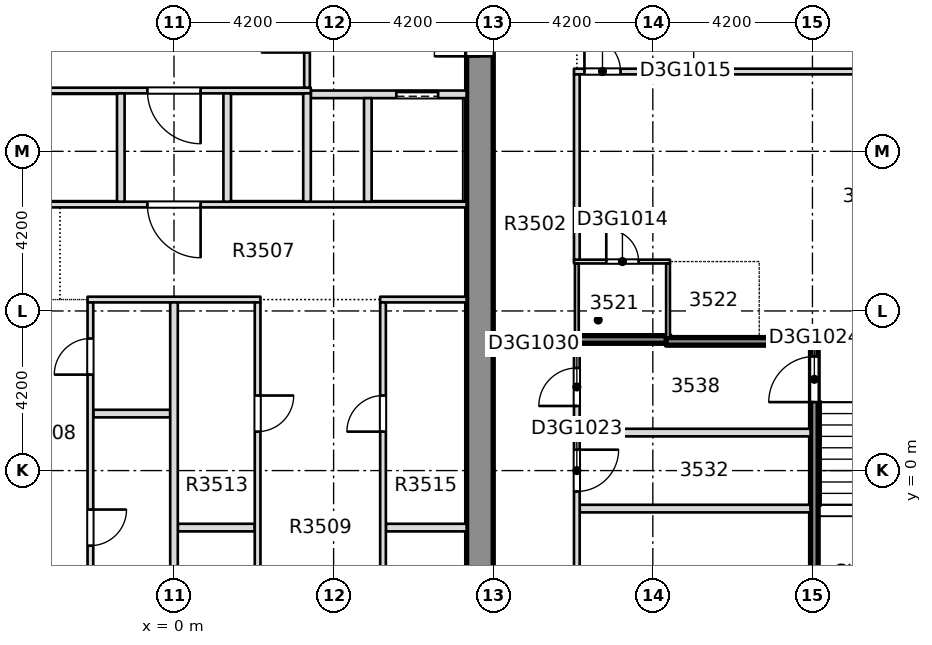
"""IFC4 building model, lengths in metres.
Left out: names, types, materials, properties, quantities, classifications, styles, units other than length and angle.
Written with IfcOpenShell. Run it as: python <this file> out.ifc"""

import sys

from ifc_helpers import new_model, si_unit, direction, frame, frame_2d, origin, place, context, subcontext, project, spatial, rectangle, extrude, element, fill, save


model = new_model("IFC4")
c1 = context("Model", 3, precision=1e-05, world=origin(), true_north=direction((0.0, 1.0)))
c2 = subcontext(c1, "Body", "Model", "MODEL_VIEW")
j1 = project(units=[si_unit("LENGTHUNIT", "METRE"), si_unit("PLANEANGLEUNIT", "RADIAN")], contexts=[c1])
p1 = place(None, origin())
s1 = spatial("IfcSite", under=j1, at=p1, CompositionType="ELEMENT")
p2 = place(p1, origin())
s2 = spatial("IfcBuilding", under=s1, at=p2, CompositionType="ELEMENT")
p3 = place(p2, frame((0.0, 0.0, 140.0)))
s3 = spatial("IfcBuildingStorey", under=s2, at=p3, CompositionType="ELEMENT", Elevation=140.0)
p4 = place(p3, frame((8.05, -8.4, -0.4), z_axis=(0.0, 0.0, 1.0), x_axis=(0.0, 1.0, 0.0)))
e1 = element("IfcWall", 1, at=p4, inside=s3, PredefinedType="SOLIDWALL", context=c2, shape_type="SweptSolid", body=[
    extrude(rectangle(XDim=30.15, YDim=0.7, at=frame_2d((15.075, 0.0))), origin(), (0.0, 0.0, 1.0), 3.45),
])
p5 = place(p4, frame((19.3, 0.0, 0.4)))
e2 = element("IfcOpeningElement", 2, at=p5, cuts=e1, PredefinedType="OPENING", context=c2, shape_type="SweptSolid", body=[
    extrude(rectangle(XDim=1.2, YDim=2.1, at=frame_2d((0.6, 1.05))), frame((0.0, 0.36, 0.0), z_axis=(0.0, -1.0, 0.0), x_axis=(1.0, 0.0, 0.0)), (0.0, 0.0, 1.0), 0.72),
])
p6 = place(p3, frame((10.677, -1.0, 0.0), z_axis=(0.0, 0.0, 1.0), x_axis=(1.0, 0.0, 0.0)))
e3 = element("IfcWall", 3, at=p6, inside=s3, PredefinedType="PARTITIONING", context=c2, shape_type="SweptSolid", body=[
    extrude(rectangle(XDim=6.071, YDim=0.2, at=frame_2d((3.036, 0.0))), origin(), (0.0, 0.0, 1.0), 3.05),
])
p7 = place(p3, frame((10.675, 1.0, 0.0), z_axis=(0.0, 0.0, 1.0), x_axis=(1.0, 0.0, 0.0)))
e4 = element("IfcWall", 4, at=p7, inside=s3, PredefinedType="PARTITIONING", context=c2, shape_type="SweptSolid", body=[
    extrude(rectangle(XDim=6.075, YDim=0.2, at=frame_2d((3.038, 0.0))), origin(), (0.0, 0.0, 1.0), 3.05),
])
p8 = place(p3, frame((10.525, 3.45, 0.0), z_axis=(0.0, 0.0, 1.0), x_axis=(1.0, 0.0, 0.0)))
e5 = element("IfcWall", 5, at=p8, inside=s3, PredefinedType="SOLIDWALL", context=c2, shape_type="SweptSolid", body=[
    extrude(rectangle(XDim=2.525, YDim=0.2, at=frame_2d((1.263, 0.0))), origin(), (0.0, 0.0, 1.0), 3.05),
])
p9 = place(p3, frame((12.95, 3.4, 0.0), z_axis=(0.0, 0.0, 1.0), x_axis=(1.0, 0.0, 0.0)))
e6 = element("IfcWall", 6, at=p9, inside=s3, PredefinedType="SOLIDWALL", context=c2, shape_type="SweptSolid", body=[
    extrude(rectangle(XDim=8.6, YDim=0.2, at=frame_2d((4.3, 0.0))), origin(), (0.0, 0.0, 1.0), 3.05),
])
p10 = place(p3, frame((10.525, 5.5, 0.0), z_axis=(0.0, 0.0, 1.0), x_axis=(1.0, 0.0, 0.0)))
e7 = element("IfcWall", 7, at=p10, inside=s3, PredefinedType="PARTITIONING", context=c2, shape_type="SweptSolid", body=[
    extrude(rectangle(XDim=2.525, YDim=0.1, at=frame_2d((1.263, 0.0))), origin(), (0.0, 0.0, 1.0), 3.05),
])
p11 = place(p10, frame((0.85, 0.0, 0.0)))
e8 = element("IfcOpeningElement", 8, at=p11, cuts=e7, PredefinedType="OPENING", context=c2, shape_type="SweptSolid", body=[
    extrude(rectangle(XDim=0.85, YDim=2.1, at=frame_2d((0.425, 1.05))), frame((0.0, 0.06, 0.0), z_axis=(0.0, -1.0, 0.0), x_axis=(1.0, 0.0, 0.0)), (0.0, 0.0, 1.0), 0.12),
])
p12 = place(p3, frame((10.525, 10.5, 0.0), z_axis=(0.0, 0.0, 1.0), x_axis=(1.0, 0.0, 0.0)))
e9 = element("IfcWall", 9, at=p12, inside=s3, PredefinedType="PARTITIONING", context=c2, shape_type="SweptSolid", body=[
    extrude(rectangle(XDim=11.025, YDim=0.15, at=frame_2d((5.513, 0.0))), origin(), (0.0, 0.0, 1.0), 3.05),
])
p13 = place(p12, frame((0.275, 0.0, 0.0)))
e10 = element("IfcOpeningElement", 10, at=p13, cuts=e9, PredefinedType="OPENING", context=c2, shape_type="SweptSolid", body=[
    extrude(rectangle(XDim=0.95, YDim=2.1, at=frame_2d((0.475, 1.05))), frame((0.0, 0.085, 0.0), z_axis=(0.0, -1.0, 0.0), x_axis=(1.0, 0.0, 0.0)), (0.0, 0.0, 1.0), 0.17),
])
p14 = place(p3, frame((10.6, -10.29, 0.0), z_axis=(0.0, 0.0, 1.0), x_axis=(0.0, 1.0, 0.0)))
e11 = element("IfcWall", 11, at=p14, inside=s3, PredefinedType="PARTITIONING", context=c2, shape_type="SweptSolid", body=[
    extrude(rectangle(XDim=13.64, YDim=0.15, at=frame_2d((6.82, 0.0))), origin(), (0.0, 0.0, 1.0), 3.05),
])
p15 = place(p14, frame((2.09, 0.0, 0.0)))
e12 = element("IfcOpeningElement", 12, at=p15, cuts=e11, PredefinedType="OPENING", context=c2, shape_type="SweptSolid", body=[
    extrude(rectangle(XDim=0.95, YDim=2.1, at=frame_2d((0.475, 1.05))), frame((0.0, 0.085, 0.0), z_axis=(0.0, -1.0, 0.0), x_axis=(1.0, 0.0, 0.0)), (0.0, 0.0, 1.0), 0.17),
])
p16 = place(p14, frame((9.74, 0.0, 0.0)))
e13 = element("IfcOpeningElement", 13, at=p16, cuts=e11, PredefinedType="OPENING", context=c2, shape_type="SweptSolid", body=[
    extrude(rectangle(XDim=1.1, YDim=2.1, at=frame_2d((0.55, 1.05))), frame((0.0, 0.085, 0.0), z_axis=(0.0, -1.0, 0.0), x_axis=(1.0, 0.0, 0.0)), (0.0, 0.0, 1.0), 0.17),
])
p17 = place(p14, frame((4.59, 0.0, 0.0)))
e14 = element("IfcOpeningElement", 14, at=p17, cuts=e11, PredefinedType="OPENING", context=c2, shape_type="SweptSolid", body=[
    extrude(rectangle(XDim=1.0, YDim=2.1, at=frame_2d((0.5, 1.05))), frame((0.0, 0.085, 0.0), z_axis=(0.0, -1.0, 0.0), x_axis=(1.0, 0.0, 0.0)), (0.0, 0.0, 1.0), 0.17),
])
p18 = place(p14, frame((11.99, 0.0, 0.0)))
e15 = element("IfcOpeningElement", 15, at=p18, cuts=e11, PredefinedType="OPENING", context=c2, shape_type="SweptSolid", body=[
    extrude(rectangle(XDim=1.0, YDim=2.1, at=frame_2d((0.5, 1.05))), frame((0.0, 0.085, 0.0), z_axis=(0.0, -1.0, 0.0), x_axis=(1.0, 0.0, 0.0)), (0.0, 0.0, 1.0), 0.17),
])
p19 = place(p3, frame((10.6, 3.45, 0.0), z_axis=(0.0, 0.0, 1.0), x_axis=(0.0, 1.0, 0.0)))
e16 = element("IfcWall", 16, at=p19, inside=s3, PredefinedType="PARTITIONING", context=c2, shape_type="SweptSolid", body=[
    extrude(rectangle(XDim=2.0, YDim=0.1, at=frame_2d((1.0, 0.0))), origin(), (0.0, 0.0, 1.0), 3.05),
])
p20 = place(p3, frame((10.6, 5.55, 0.0), z_axis=(0.0, 0.0, 1.0), x_axis=(0.0, 1.0, 0.0)))
e17 = element("IfcWall", 17, at=p20, inside=s3, PredefinedType="PARTITIONING", context=c2, shape_type="SweptSolid", body=[
    extrude(rectangle(XDim=4.875, YDim=0.15, at=frame_2d((2.438, 0.0))), origin(), (0.0, 0.0, 1.0), 3.05),
])
p21 = place(p3, frame((13.0, 3.5, 0.0), z_axis=(0.0, 0.0, 1.0), x_axis=(0.0, 1.0, 0.0)))
e18 = element("IfcWall", 18, at=p21, inside=s3, PredefinedType="PARTITIONING", context=c2, shape_type="SweptSolid", body=[
    extrude(rectangle(XDim=1.95, YDim=0.1, at=frame_2d((0.975, 0.0))), origin(), (0.0, 0.0, 1.0), 3.05),
])
p22 = place(p3, frame((16.85, -3.298, 0.0), z_axis=(0.0, 0.0, 1.0), x_axis=(0.0, 1.0, 0.0)))
e19 = element("IfcWall", 19, at=p22, inside=s3, PredefinedType="SOLIDWALL", context=c2, shape_type="SweptSolid", body=[
    extrude(rectangle(XDim=6.598, YDim=0.2, at=frame_2d((3.299, 0.0))), origin(), (0.0, 0.0, 1.0), 3.05),
])
p23 = place(p22, frame((5.1, 0.0, 0.0)))
e20 = element("IfcOpeningElement", 20, at=p23, cuts=e19, PredefinedType="OPENING", context=c2, shape_type="SweptSolid", body=[
    extrude(rectangle(XDim=1.2, YDim=2.1, at=frame_2d((0.6, 1.05))), frame((0.0, 0.11, 0.0), z_axis=(0.0, -1.0, 0.0), x_axis=(1.0, 0.0, 0.0)), (0.0, 0.0, 1.0), 0.22),
])
p24 = place(p3, frame((0.1, -1.5, 0.0), z_axis=(0.0, 0.0, 1.0), x_axis=(1.0, 0.0, 0.0)))
e21 = element("IfcWall", 21, at=p24, inside=s3, PredefinedType="PARTITIONING", context=c2, shape_type="SweptSolid", body=[
    extrude(rectangle(XDim=2.025, YDim=0.2, at=frame_2d((1.012, 0.0))), origin(), (0.0, 0.0, 1.0), 3.05),
])
p25 = place(p3, frame((5.575, -1.5, 0.0), z_axis=(0.0, 0.0, 1.0), x_axis=(1.0, 0.0, 0.0)))
e22 = element("IfcWall", 22, at=p25, inside=s3, PredefinedType="PARTITIONING", context=c2, shape_type="SweptSolid", body=[
    extrude(rectangle(XDim=2.124, YDim=0.2, at=frame_2d((1.062, 0.0))), origin(), (0.0, 0.0, 1.0), 3.05),
])
p26 = place(p3, frame((-2.125, 1.5, 0.0), z_axis=(0.0, 0.0, 1.0), x_axis=(1.0, 0.0, 0.0)))
e23 = element("IfcWall", 23, at=p26, inside=s3, PredefinedType="PARTITIONING", context=c2, shape_type="SweptSolid", body=[
    extrude(rectangle(XDim=2.025, YDim=0.2, at=frame_2d((1.012, 0.0))), origin(), (0.0, 0.0, 1.0), 3.05),
])
p27 = place(p3, frame((-2.275, 4.5, 0.0), z_axis=(0.0, 0.0, 1.0), x_axis=(1.0, 0.0, 0.0)))
e24 = element("IfcWall", 24, at=p27, inside=s3, PredefinedType="PARTITIONING", context=c2, shape_type="SweptSolid", body=[
    extrude(rectangle(XDim=4.55, YDim=0.15, at=frame_2d((2.275, 0.0))), origin(), (0.0, 0.0, 1.0), 3.05),
])
p28 = place(p3, frame((5.425, 4.5, 0.0), z_axis=(0.0, 0.0, 1.0), x_axis=(1.0, 0.0, 0.0)))
e25 = element("IfcWall", 25, at=p28, inside=s3, PredefinedType="PARTITIONING", context=c2, shape_type="SweptSolid", body=[
    extrude(rectangle(XDim=2.274, YDim=0.15, at=frame_2d((1.137, 0.0))), origin(), (0.0, 0.0, 1.0), 3.05),
])
p29 = place(p3, frame((-7.699, 7.0, 0.0), z_axis=(0.0, 0.0, 1.0), x_axis=(1.0, 0.0, 0.0)))
e26 = element("IfcWall", 26, at=p29, inside=s3, PredefinedType="PARTITIONING", context=c2, shape_type="SweptSolid", body=[
    extrude(rectangle(XDim=15.398, YDim=0.15, at=frame_2d((7.699, 0.0))), origin(), (0.0, 0.0, 1.0), 3.05),
])
p30 = place(p29, frame((6.999, 0.0, 0.0)))
e27 = element("IfcOpeningElement", 27, at=p30, cuts=e26, PredefinedType="OPENING", context=c2, shape_type="SweptSolid", body=[
    extrude(rectangle(XDim=1.4, YDim=2.1, at=frame_2d((0.7, 1.05))), frame((0.0, 0.085, 0.0), z_axis=(0.0, -1.0, 0.0), x_axis=(1.0, 0.0, 0.0)), (0.0, 0.0, 1.0), 0.17),
])
p31 = place(p3, frame((3.6, 9.9, 0.0), z_axis=(0.0, 0.0, 1.0), x_axis=(1.0, 0.0, 0.0)))
e28 = element("IfcWall", 28, at=p31, inside=s3, PredefinedType="PARTITIONING", context=c2, shape_type="SweptSolid", body=[
    extrude(rectangle(XDim=4.099, YDim=0.2, at=frame_2d((2.049, 0.0))), origin(), (0.0, 0.0, 1.0), 3.05),
])
p32 = place(p31, frame((2.25, 0.0, 0.0)))
e29 = element("IfcOpeningElement", 29, at=p32, cuts=e28, PredefinedType="OPENING", context=c2, shape_type="SweptSolid", body=[
    extrude(rectangle(XDim=1.1, YDim=2.1, at=frame_2d((0.55, 1.05))), frame((0.0, 0.11, 0.0), z_axis=(0.0, -1.0, 0.0), x_axis=(1.0, 0.0, 0.0)), (0.0, 0.0, 1.0), 0.22),
])
p33 = place(p3, frame((-3.6, 10.0, 0.0), z_axis=(0.0, 0.0, 1.0), x_axis=(1.0, 0.0, 0.0)))
e30 = element("IfcWall", 30, at=p33, inside=s3, PredefinedType="PARTITIONING", context=c2, shape_type="SweptSolid", body=[
    extrude(rectangle(XDim=7.2, YDim=0.15, at=frame_2d((3.6, 0.0))), origin(), (0.0, 0.0, 1.0), 3.05),
])
p34 = place(p33, frame((2.9, 0.0, 0.0)))
e31 = element("IfcOpeningElement", 31, at=p34, cuts=e30, PredefinedType="OPENING", context=c2, shape_type="SweptSolid", body=[
    extrude(rectangle(XDim=1.4, YDim=2.1, at=frame_2d((0.7, 1.05))), frame((0.0, 0.085, 0.0), z_axis=(0.0, -1.0, 0.0), x_axis=(1.0, 0.0, 0.0)), (0.0, 0.0, 1.0), 0.17),
])
p35 = place(p3, frame((-2.2, -7.699, 0.0), z_axis=(0.0, 0.0, 1.0), x_axis=(0.0, 1.0, 0.0)))
e32 = element("IfcWall", 32, at=p35, inside=s3, PredefinedType="PARTITIONING", context=c2, shape_type="SweptSolid", body=[
    extrude(rectangle(XDim=12.124, YDim=0.15, at=frame_2d((6.062, 0.0))), origin(), (0.0, 0.0, 1.0), 3.05),
])
p36 = place(p35, frame((1.149, 0.0, 0.0)))
e33 = element("IfcOpeningElement", 33, at=p36, cuts=e32, PredefinedType="OPENING", context=c2, shape_type="SweptSolid", body=[
    extrude(rectangle(XDim=1.1, YDim=2.1, at=frame_2d((0.55, 1.05))), frame((0.0, 0.085, 0.0), z_axis=(0.0, -1.0, 0.0), x_axis=(1.0, 0.0, 0.0)), (0.0, 0.0, 1.0), 0.17),
])
p37 = place(p35, frame((5.724, 0.0, 0.0)))
e34 = element("IfcOpeningElement", 34, at=p37, cuts=e32, PredefinedType="OPENING", context=c2, shape_type="SweptSolid", body=[
    extrude(rectangle(XDim=0.95, YDim=2.1, at=frame_2d((0.475, 1.05))), frame((0.0, 0.085, 0.0), z_axis=(0.0, -1.0, 0.0), x_axis=(1.0, 0.0, 0.0)), (0.0, 0.0, 1.0), 0.17),
])
p38 = place(p35, frame((10.224, 0.0, 0.0)))
e35 = element("IfcOpeningElement", 35, at=p38, cuts=e32, PredefinedType="OPENING", context=c2, shape_type="SweptSolid", body=[
    extrude(rectangle(XDim=0.95, YDim=2.1, at=frame_2d((0.475, 1.05))), frame((0.0, 0.085, 0.0), z_axis=(0.0, -1.0, 0.0), x_axis=(1.0, 0.0, 0.0)), (0.0, 0.0, 1.0), 0.17),
])
p39 = place(p3, frame((-1.4, 7.075, 0.0), z_axis=(0.0, 0.0, 1.0), x_axis=(0.0, 1.0, 0.0)))
e36 = element("IfcWall", 36, at=p39, inside=s3, PredefinedType="PARTITIONING", context=c2, shape_type="SweptSolid", body=[
    extrude(rectangle(XDim=2.85, YDim=0.2, at=frame_2d((1.425, 0.0))), origin(), (0.0, 0.0, 1.0), 3.05),
])
p40 = place(p3, frame((0.0, -7.699, 0.0), z_axis=(0.0, 0.0, 1.0), x_axis=(0.0, 1.0, 0.0)))
e37 = element("IfcWall", 37, at=p40, inside=s3, PredefinedType="PARTITIONING", context=c2, shape_type="SweptSolid", body=[
    extrude(rectangle(XDim=12.124, YDim=0.2, at=frame_2d((6.062, 0.0))), origin(), (0.0, 0.0, 1.0), 3.05),
])
p41 = place(p3, frame((1.4, 7.075, 0.0), z_axis=(0.0, 0.0, 1.0), x_axis=(0.0, 1.0, 0.0)))
e38 = element("IfcWall", 38, at=p41, inside=s3, PredefinedType="PARTITIONING", context=c2, shape_type="SweptSolid", body=[
    extrude(rectangle(XDim=2.85, YDim=0.2, at=frame_2d((1.425, 0.0))), origin(), (0.0, 0.0, 1.0), 3.05),
])
p42 = place(p3, frame((2.2, -7.699, 0.0), z_axis=(0.0, 0.0, 1.0), x_axis=(0.0, 1.0, 0.0)))
e39 = element("IfcWall", 39, at=p42, inside=s3, PredefinedType="PARTITIONING", context=c2, shape_type="SweptSolid", body=[
    extrude(rectangle(XDim=12.124, YDim=0.15, at=frame_2d((6.062, 0.0))), origin(), (0.0, 0.0, 1.0), 3.05),
])
p43 = place(p42, frame((2.724, 0.0, 0.0)))
e40 = element("IfcOpeningElement", 40, at=p43, cuts=e39, PredefinedType="OPENING", context=c2, shape_type="SweptSolid", body=[
    extrude(rectangle(XDim=0.95, YDim=2.1, at=frame_2d((0.475, 1.05))), frame((0.0, 0.085, 0.0), z_axis=(0.0, -1.0, 0.0), x_axis=(1.0, 0.0, 0.0)), (0.0, 0.0, 1.0), 0.17),
])
p44 = place(p42, frame((8.724, 0.0, 0.0)))
e41 = element("IfcOpeningElement", 41, at=p44, cuts=e39, PredefinedType="OPENING", context=c2, shape_type="SweptSolid", body=[
    extrude(rectangle(XDim=0.95, YDim=2.1, at=frame_2d((0.475, 1.05))), frame((0.0, 0.085, 0.0), z_axis=(0.0, -1.0, 0.0), x_axis=(1.0, 0.0, 0.0)), (0.0, 0.0, 1.0), 0.17),
])
p45 = place(p3, frame((3.5, 7.075, 0.0), z_axis=(0.0, 0.0, 1.0), x_axis=(0.0, 1.0, 0.0)))
e42 = element("IfcWall", 42, at=p45, inside=s3, PredefinedType="PARTITIONING", context=c2, shape_type="SweptSolid", body=[
    extrude(rectangle(XDim=2.85, YDim=0.2, at=frame_2d((1.425, 0.0))), origin(), (0.0, 0.0, 1.0), 3.05),
])
p46 = place(p3, frame((3.5, 10.075, 0.0), z_axis=(0.0, 0.0, 1.0), x_axis=(0.0, 1.0, 0.0)))
e43 = element("IfcWall", 43, at=p46, inside=s3, PredefinedType="PARTITIONING", context=c2, shape_type="SweptSolid", body=[
    extrude(rectangle(XDim=3.075, YDim=0.15, at=frame_2d((1.538, 0.0))), origin(), (0.0, 0.0, 1.0), 3.05),
])
p47 = place(p46, frame((0.925, 0.0, 0.0)))
e44 = element("IfcOpeningElement", 44, at=p47, cuts=e43, PredefinedType="OPENING", context=c2, shape_type="SweptSolid", body=[
    extrude(rectangle(XDim=1.2, YDim=2.1, at=frame_2d((0.6, 1.05))), frame((0.0, 0.085, 0.0), z_axis=(0.0, -1.0, 0.0), x_axis=(1.0, 0.0, 0.0)), (0.0, 0.0, 1.0), 0.17),
])
p48 = place(p3, frame((5.1, 7.075, 0.0), z_axis=(0.0, 0.0, 1.0), x_axis=(0.0, 1.0, 0.0)))
e45 = element("IfcWall", 45, at=p48, inside=s3, PredefinedType="PARTITIONING", context=c2, shape_type="SweptSolid", body=[
    extrude(rectangle(XDim=2.725, YDim=0.2, at=frame_2d((1.363, 0.0))), origin(), (0.0, 0.0, 1.0), 3.05),
])
p49 = place(p3, frame((5.5, -7.699, 0.0), z_axis=(0.0, 0.0, 1.0), x_axis=(0.0, 1.0, 0.0)))
e46 = element("IfcWall", 46, at=p49, inside=s3, PredefinedType="PARTITIONING", context=c2, shape_type="SweptSolid", body=[
    extrude(rectangle(XDim=12.124, YDim=0.15, at=frame_2d((6.062, 0.0))), origin(), (0.0, 0.0, 1.0), 3.05),
])
p50 = place(p49, frame((2.724, 0.0, 0.0)))
e47 = element("IfcOpeningElement", 47, at=p50, cuts=e46, PredefinedType="OPENING", context=c2, shape_type="SweptSolid", body=[
    extrude(rectangle(XDim=0.95, YDim=2.1, at=frame_2d((0.475, 1.05))), frame((0.0, 0.085, 0.0), z_axis=(0.0, -1.0, 0.0), x_axis=(1.0, 0.0, 0.0)), (0.0, 0.0, 1.0), 0.17),
])
p51 = place(p49, frame((8.724, 0.0, 0.0)))
e48 = element("IfcOpeningElement", 48, at=p51, cuts=e46, PredefinedType="OPENING", context=c2, shape_type="SweptSolid", body=[
    extrude(rectangle(XDim=0.95, YDim=2.1, at=frame_2d((0.475, 1.05))), frame((0.0, 0.085, 0.0), z_axis=(0.0, -1.0, 0.0), x_axis=(1.0, 0.0, 0.0)), (0.0, 0.0, 1.0), 0.17),
])
p52 = place(p13, origin())
e49 = element("IfcDoor", 49, at=p52, inside=s3, OperationType="SINGLE_SWING_RIGHT", PredefinedType="DOOR", context=c2, shape_type="SweptSolid", body=[
    extrude(rectangle(XDim=0.95, YDim=2.1, at=frame_2d((0.475, 1.05))), frame((0.0, 0.025, 0.0), z_axis=(0.0, -1.0, 0.0), x_axis=(1.0, 0.0, 0.0)), (0.0, 0.0, 1.0), 0.05),
])
fill(e10, e49)
p53 = place(p11, origin())
e50 = element("IfcDoor", 50, at=p53, inside=s3, OperationType="SINGLE_SWING_RIGHT", PredefinedType="DOOR", context=c2, shape_type="SweptSolid", body=[
    extrude(rectangle(XDim=0.85, YDim=2.1, at=frame_2d((0.425, 1.05))), frame((0.0, 0.025, 0.0), z_axis=(0.0, -1.0, 0.0), x_axis=(1.0, 0.0, 0.0)), (0.0, 0.0, 1.0), 0.05),
])
fill(e8, e50)
p54 = place(p16, origin())
e51 = element("IfcDoor", 51, at=p54, inside=s3, OperationType="SINGLE_SWING_LEFT", PredefinedType="DOOR", context=c2, shape_type="SweptSolid", body=[
    extrude(rectangle(XDim=1.1, YDim=2.1, at=frame_2d((0.55, 1.05))), frame((0.0, 0.025, 0.0), z_axis=(0.0, -1.0, 0.0), x_axis=(1.0, 0.0, 0.0)), (0.0, 0.0, 1.0), 0.05),
])
fill(e13, e51)
p55 = place(p23, origin())
e52 = element("IfcDoor", 52, at=p55, inside=s3, OperationType="SINGLE_SWING_LEFT", PredefinedType="DOOR", context=c2, shape_type="SweptSolid", body=[
    extrude(rectangle(XDim=1.2, YDim=2.1, at=frame_2d((0.6, 1.05))), frame((0.0, 0.025, 0.0), z_axis=(0.0, -1.0, 0.0), x_axis=(1.0, 0.0, 0.0)), (0.0, 0.0, 1.0), 0.05),
])
fill(e20, e52)
p56 = place(p18, origin())
e53 = element("IfcDoor", 53, at=p56, inside=s3, OperationType="SINGLE_SWING_LEFT", PredefinedType="DOOR", context=c2, shape_type="SweptSolid", body=[
    extrude(rectangle(XDim=1.0, YDim=2.1, at=frame_2d((0.5, 1.05))), frame((0.0, 0.025, 0.0), z_axis=(0.0, -1.0, 0.0), x_axis=(1.0, 0.0, 0.0)), (0.0, 0.0, 1.0), 0.05),
])
fill(e15, e53)
p57 = place(p37, origin())
e54 = element("IfcDoor", 54, at=p57, inside=s3, OperationType="SINGLE_SWING_LEFT", PredefinedType="DOOR", context=c2, shape_type="SweptSolid", body=[
    extrude(rectangle(XDim=0.95, YDim=2.1, at=frame_2d((0.475, 1.05))), frame((0.0, 0.025, 0.0), z_axis=(0.0, -1.0, 0.0), x_axis=(1.0, 0.0, 0.0)), (0.0, 0.0, 1.0), 0.05),
])
fill(e34, e54)
p58 = place(p38, origin())
e55 = element("IfcDoor", 55, at=p58, inside=s3, OperationType="SINGLE_SWING_RIGHT", PredefinedType="DOOR", context=c2, shape_type="SweptSolid", body=[
    extrude(rectangle(XDim=0.95, YDim=2.1, at=frame_2d((0.475, 1.05))), frame((0.0, 0.025, 0.0), z_axis=(0.0, -1.0, 0.0), x_axis=(1.0, 0.0, 0.0)), (0.0, 0.0, 1.0), 0.05),
])
fill(e35, e55)
p59 = place(p44, origin())
e56 = element("IfcDoor", 56, at=p59, inside=s3, OperationType="SINGLE_SWING_RIGHT", PredefinedType="DOOR", context=c2, shape_type="SweptSolid", body=[
    extrude(rectangle(XDim=0.95, YDim=2.1, at=frame_2d((0.475, 1.05))), frame((0.0, 0.025, 0.0), z_axis=(0.0, -1.0, 0.0), x_axis=(1.0, 0.0, 0.0)), (0.0, 0.0, 1.0), 0.05),
])
fill(e41, e56)
p60 = place(p51, origin())
e57 = element("IfcDoor", 57, at=p60, inside=s3, OperationType="SINGLE_SWING_LEFT", PredefinedType="DOOR", context=c2, shape_type="SweptSolid", body=[
    extrude(rectangle(XDim=0.95, YDim=2.1, at=frame_2d((0.475, 1.05))), frame((0.0, 0.025, 0.0), z_axis=(0.0, -1.0, 0.0), x_axis=(1.0, 0.0, 0.0)), (0.0, 0.0, 1.0), 0.05),
])
fill(e48, e57)
p61 = place(p32, origin())
e58 = element("IfcDoor", 58, at=p61, inside=s3, OperationType="SLIDING_TO_LEFT", PredefinedType="DOOR", context=c2, shape_type="SweptSolid", body=[
    extrude(rectangle(XDim=1.1, YDim=2.1, at=frame_2d((0.55, 1.05))), frame((0.0, 0.025, 0.0), z_axis=(0.0, -1.0, 0.0), x_axis=(1.0, 0.0, 0.0)), (0.0, 0.0, 1.0), 0.05),
])
fill(e29, e58)
p62 = place(p30, origin())
e59 = element("IfcDoor", 59, at=p62, inside=s3, OperationType="SINGLE_SWING_RIGHT", PredefinedType="DOOR", context=c2, shape_type="SweptSolid", body=[
    extrude(rectangle(XDim=1.4, YDim=2.1, at=frame_2d((0.7, 1.05))), frame((0.0, 0.025, 0.0), z_axis=(0.0, -1.0, 0.0), x_axis=(1.0, 0.0, 0.0)), (0.0, 0.0, 1.0), 0.05),
])
fill(e27, e59)
p63 = place(p34, origin())
e60 = element("IfcDoor", 60, at=p63, inside=s3, OperationType="SINGLE_SWING_RIGHT", PredefinedType="DOOR", context=c2, shape_type="SweptSolid", body=[
    extrude(rectangle(XDim=1.4, YDim=2.1, at=frame_2d((0.7, 1.05))), frame((0.0, 0.025, 0.0), z_axis=(0.0, -1.0, 0.0), x_axis=(1.0, 0.0, 0.0)), (0.0, 0.0, 1.0), 0.05),
])
fill(e31, e60)
p64 = place(p5, origin())
e61 = element("IfcDoor", 61, at=p64, inside=s3, OperationType="SINGLE_SWING_LEFT", PredefinedType="DOOR", context=c2, shape_type="SweptSolid", body=[
    extrude(rectangle(XDim=1.2, YDim=2.1, at=frame_2d((0.6, 1.05))), frame((0.0, 0.025, 0.0), z_axis=(0.0, -1.0, 0.0), x_axis=(1.0, 0.0, 0.0)), (0.0, 0.0, 1.0), 0.05),
])
fill(e2, e61)
save(model, sys.argv[1])
